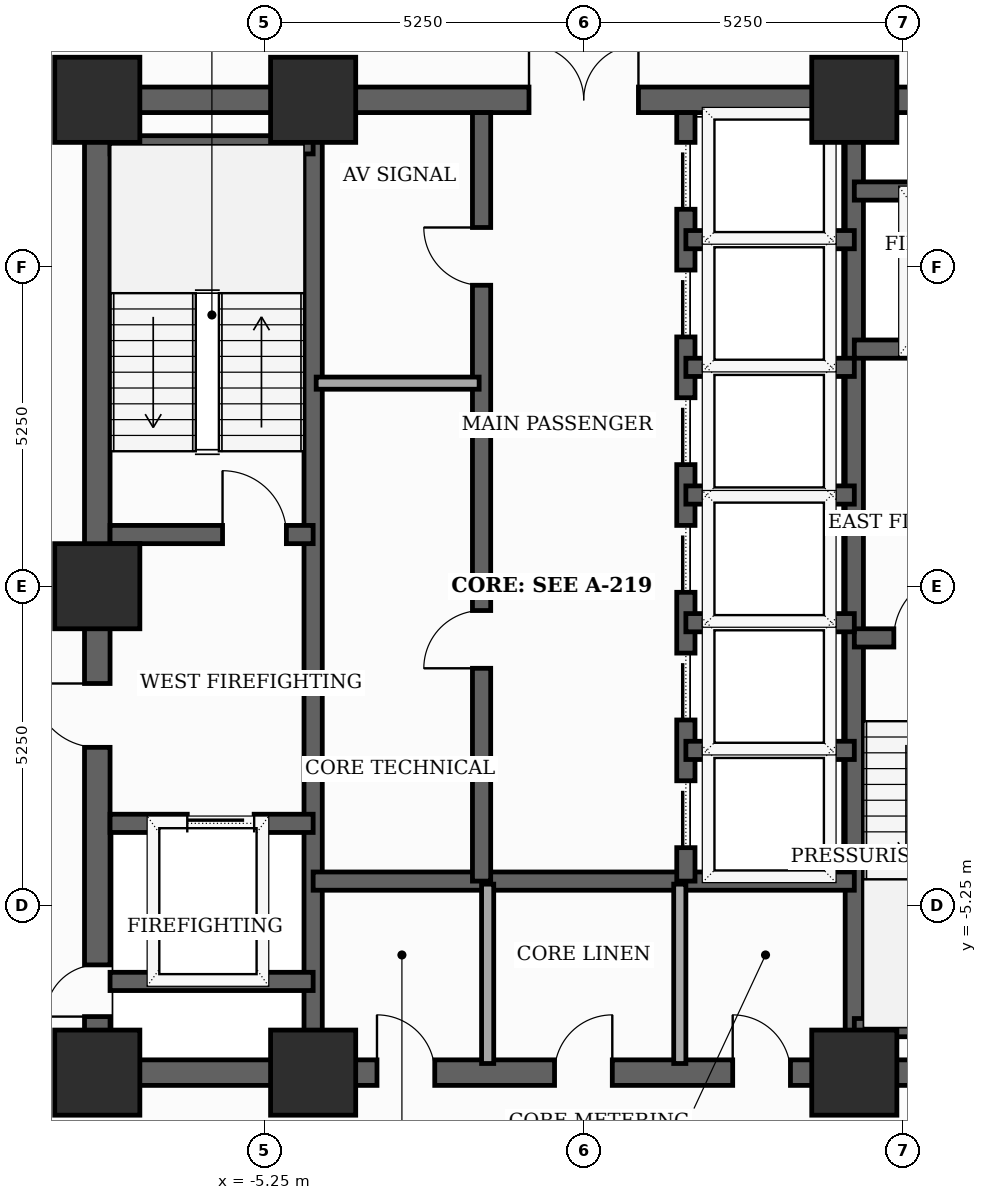
"""IFC4 building model, lengths in metres.
Left out: names, types, materials, properties, quantities, classifications, styles, units other than length and angle.
Written with IfcOpenShell. Run it as: python <this file> out.ifc"""

import sys

from ifc_helpers import new_model, si_unit, direction, frame, frame_2d, origin, origin_2d, place, context, subcontext, project, spatial, rectangle, extrude, element, fill, save


model = new_model("IFC4")
c1 = context("Model", 3, precision=1e-05, world=origin(), true_north=direction((0.0, 1.0)))
c2 = subcontext(c1, "Body", "Model", "MODEL_VIEW")
j1 = project(units=[si_unit("LENGTHUNIT", "METRE"), si_unit("PLANEANGLEUNIT", "RADIAN")], contexts=[c1])
p1 = place(None, origin())
s1 = spatial("IfcSite", under=j1, at=p1, CompositionType="ELEMENT")
p2 = place(p1, origin())
s2 = spatial("IfcBuilding", under=s1, at=p2, CompositionType="ELEMENT")
p3 = place(p2, frame((0.0, 0.0, 169.4)))
s3 = spatial("IfcBuildingStorey", under=s2, at=p3, CompositionType="ELEMENT", Elevation=169.4)
for number, where, z_axis, x_axis in (
    (1, (-8.0, -8.0, 0.0), (0.0, 0.0, 1.0), (1.0, 0.0, 0.0)),
    (2, (-4.45, -8.0, 0.0), (0.0, 0.0, 1.0), (1.0, 0.0, 0.0)),
    (3, (4.45, -8.0, 0.0), (0.0, 0.0, 1.0), (1.0, 0.0, 0.0)),
    (4, (4.45, 8.0, 0.0), (0.0, 0.0, 1.0), (1.0, 0.0, 0.0)),
    (5, (-4.45, 8.0, 0.0), (0.0, 0.0, 1.0), (1.0, 0.0, 0.0)),
    (6, (-8.0, 8.0, 0.0), (0.0, 0.0, 1.0), (1.0, 0.0, 0.0)),
    (7, (-8.0, 0.0, 0.0), (0.0, 0.0, 1.0), (1.0, 0.0, 0.0)),
):
    element("IfcColumn", number, at=place(p3, frame(where, z_axis=z_axis, x_axis=x_axis)), inside=s3, PredefinedType="COLUMN", context=c2, shape_type="SweptSolid", body=[
        extrude(rectangle(XDim=1.4, YDim=1.4, at=origin_2d()), origin(), (0.0, 0.0, 1.0), 3.7),
    ])
p4 = place(p3, frame((-8.0, -8.0, 0.0), z_axis=(0.0, 0.0, 1.0), x_axis=(0.0, 1.0, 0.0)))
e8 = element("IfcWall", 8, at=p4, inside=s3, PredefinedType="SHEAR", context=c2, shape_type="SweptSolid", body=[
    extrude(rectangle(XDim=16.0, YDim=0.42, at=frame_2d((8.0, 0.0))), origin(), (0.0, 0.0, 1.0), 3.5),
])
p5 = place(p4, frame((0.922, 0.0, 0.0)))
e9 = element("IfcOpeningElement", 9, at=p5, cuts=e8, PredefinedType="OPENING", context=c2, shape_type="SweptSolid", body=[
    extrude(rectangle(XDim=0.85, YDim=2.02, at=frame_2d((0.425, 1.01))), frame((0.0, 0.22, 0.0), z_axis=(0.0, -1.0, 0.0), x_axis=(1.0, 0.0, 0.0)), (0.0, 0.0, 1.0), 0.44),
])
p6 = place(p4, frame((5.35, 0.0, 0.0)))
e10 = element("IfcOpeningElement", 10, at=p6, cuts=e8, PredefinedType="OPENING", context=c2, shape_type="SweptSolid", body=[
    extrude(rectangle(XDim=1.05, YDim=2.15, at=frame_2d((0.525, 1.075))), frame((0.0, 0.22, 0.0), z_axis=(0.0, -1.0, 0.0), x_axis=(1.0, 0.0, 0.0)), (0.0, 0.0, 1.0), 0.44),
])
p7 = place(p3, frame((-8.0, -8.0, 0.0), z_axis=(0.0, 0.0, 1.0), x_axis=(1.0, 0.0, 0.0)))
e11 = element("IfcWall", 11, at=p7, inside=s3, PredefinedType="SHEAR", context=c2, shape_type="SweptSolid", body=[
    extrude(rectangle(XDim=16.0, YDim=0.42, at=frame_2d((8.0, 0.0))), origin(), (0.0, 0.0, 1.0), 3.5),
])
p8 = place(p7, frame((4.6, 0.0, 0.0)))
e12 = element("IfcOpeningElement", 12, at=p8, cuts=e11, PredefinedType="OPENING", context=c2, shape_type="SweptSolid", body=[
    extrude(rectangle(XDim=0.95, YDim=2.1, at=frame_2d((0.475, 1.05))), frame((0.0, 0.22, 0.0), z_axis=(0.0, -1.0, 0.0), x_axis=(1.0, 0.0, 0.0)), (0.0, 0.0, 1.0), 0.44),
])
p9 = place(p7, frame((7.52, 0.0, 0.0)))
e13 = element("IfcOpeningElement", 13, at=p9, cuts=e11, PredefinedType="OPENING", context=c2, shape_type="SweptSolid", body=[
    extrude(rectangle(XDim=0.95, YDim=2.1, at=frame_2d((0.475, 1.05))), frame((0.0, 0.22, 0.0), z_axis=(0.0, -1.0, 0.0), x_axis=(1.0, 0.0, 0.0)), (0.0, 0.0, 1.0), 0.44),
])
p10 = place(p7, frame((10.45, 0.0, 0.0)))
e14 = element("IfcOpeningElement", 14, at=p10, cuts=e11, PredefinedType="OPENING", context=c2, shape_type="SweptSolid", body=[
    extrude(rectangle(XDim=0.95, YDim=2.1, at=frame_2d((0.475, 1.05))), frame((0.0, 0.22, 0.0), z_axis=(0.0, -1.0, 0.0), x_axis=(1.0, 0.0, 0.0)), (0.0, 0.0, 1.0), 0.44),
])
p11 = place(p3, frame((-8.0, 8.0, 0.0), z_axis=(0.0, 0.0, 1.0), x_axis=(1.0, 0.0, 0.0)))
e15 = element("IfcWall", 15, at=p11, inside=s3, PredefinedType="SHEAR", context=c2, shape_type="SweptSolid", body=[
    extrude(rectangle(XDim=16.0, YDim=0.42, at=frame_2d((8.0, 0.0))), origin(), (0.0, 0.0, 1.0), 3.5),
])
p12 = place(p11, frame((7.1, 0.0, 0.0)))
e16 = element("IfcOpeningElement", 16, at=p12, cuts=e15, PredefinedType="OPENING", context=c2, shape_type="SweptSolid", body=[
    extrude(rectangle(XDim=1.8, YDim=2.15, at=frame_2d((0.9, 1.075))), frame((0.0, 0.22, 0.0), z_axis=(0.0, -1.0, 0.0), x_axis=(1.0, 0.0, 0.0)), (0.0, 0.0, 1.0), 0.44),
])
for number, where, z_axis, x_axis in (
    (17, (-4.45, -7.79, 0.0), (0.0, 0.0, 1.0), (0.0, 1.0, 0.0)),
    (18, (4.45, -7.79, 0.0), (0.0, 0.0, 1.0), (0.0, 1.0, 0.0)),
):
    element("IfcWall", number, at=place(p3, frame(where, z_axis=z_axis, x_axis=x_axis)), inside=s3, PredefinedType="SHEAR", context=c2, shape_type="SweptSolid", body=[
        extrude(rectangle(XDim=15.58, YDim=0.3, at=frame_2d((7.79, 0.0))), origin(), (0.0, 0.0, 1.0), 3.5),
    ])
p13 = place(p3, frame((-7.79, 0.85, 0.0), z_axis=(0.0, 0.0, 1.0), x_axis=(1.0, 0.0, 0.0)))
e19 = element("IfcWall", 19, at=p13, inside=s3, PredefinedType="SHEAR", context=c2, shape_type="SweptSolid", body=[
    extrude(rectangle(XDim=3.34, YDim=0.3, at=frame_2d((1.67, 0.0))), origin(), (0.0, 0.0, 1.0), 3.5),
])
p14 = place(p13, frame((1.85, 0.0, 0.0)))
e20 = element("IfcOpeningElement", 20, at=p14, cuts=e19, PredefinedType="OPENING", context=c2, shape_type="SweptSolid", body=[
    extrude(rectangle(XDim=1.05, YDim=2.15, at=frame_2d((0.525, 1.075))), frame((0.0, 0.16, 0.0), z_axis=(0.0, -1.0, 0.0), x_axis=(1.0, 0.0, 0.0)), (0.0, 0.0, 1.0), 0.32),
])
p15 = place(p3, frame((-7.79, 7.26, 0.0), z_axis=(0.0, 0.0, 1.0), x_axis=(1.0, 0.0, 0.0)))
e21 = element("IfcWall", 21, at=p15, inside=s3, PredefinedType="SHEAR", context=c2, shape_type="SweptSolid", body=[
    extrude(rectangle(XDim=3.34, YDim=0.3, at=frame_2d((1.67, 0.0))), origin(), (0.0, 0.0, 1.0), 3.5),
])
p16 = place(p3, frame((4.45, -0.85, 0.0), z_axis=(0.0, 0.0, 1.0), x_axis=(1.0, 0.0, 0.0)))
e22 = element("IfcWall", 22, at=p16, inside=s3, PredefinedType="SHEAR", context=c2, shape_type="SweptSolid", body=[
    extrude(rectangle(XDim=3.34, YDim=0.3, at=frame_2d((1.67, 0.0))), origin(), (0.0, 0.0, 1.0), 3.5),
])
p17 = place(p16, frame((0.65, 0.0, 0.0)))
e23 = element("IfcOpeningElement", 23, at=p17, cuts=e22, PredefinedType="OPENING", context=c2, shape_type="SweptSolid", body=[
    extrude(rectangle(XDim=1.05, YDim=2.15, at=frame_2d((0.525, 1.075))), frame((0.0, 0.16, 0.0), z_axis=(0.0, -1.0, 0.0), x_axis=(1.0, 0.0, 0.0)), (0.0, 0.0, 1.0), 0.32),
])
p18 = place(p3, frame((4.45, -7.26, 0.0), z_axis=(0.0, 0.0, 1.0), x_axis=(1.0, 0.0, 0.0)))
e24 = element("IfcWall", 24, at=p18, inside=s3, PredefinedType="SHEAR", context=c2, shape_type="SweptSolid", body=[
    extrude(rectangle(XDim=3.55, YDim=0.3, at=frame_2d((1.775, 0.0))), origin(), (0.0, 0.0, 1.0), 3.5),
])
p19 = place(p3, frame((-7.79, -3.9, 0.0), z_axis=(0.0, 0.0, 1.0), x_axis=(1.0, 0.0, 0.0)))
e25 = element("IfcWall", 25, at=p19, inside=s3, PredefinedType="SHEAR", context=c2, shape_type="SweptSolid", body=[
    extrude(rectangle(XDim=3.34, YDim=0.3, at=frame_2d((1.67, 0.0))), origin(), (0.0, 0.0, 1.0), 3.5),
])
p20 = place(p19, frame((1.27, 0.0, 0.0)))
e26 = element("IfcOpeningElement", 26, at=p20, cuts=e25, PredefinedType="OPENING", context=c2, shape_type="SweptSolid", body=[
    extrude(rectangle(XDim=1.1, YDim=2.1, at=frame_2d((0.55, 1.05))), frame((0.0, 0.16, 0.0), z_axis=(0.0, -1.0, 0.0), x_axis=(1.0, 0.0, 0.0)), (0.0, 0.0, 1.0), 0.32),
])
p21 = place(p3, frame((-7.79, -6.5, 0.0), z_axis=(0.0, 0.0, 1.0), x_axis=(1.0, 0.0, 0.0)))
e27 = element("IfcWall", 27, at=p21, inside=s3, PredefinedType="SHEAR", context=c2, shape_type="SweptSolid", body=[
    extrude(rectangle(XDim=3.34, YDim=0.3, at=frame_2d((1.67, 0.0))), origin(), (0.0, 0.0, 1.0), 3.5),
])
p22 = place(p3, frame((4.45, 3.9, 0.0), z_axis=(0.0, 0.0, 1.0), x_axis=(1.0, 0.0, 0.0)))
e28 = element("IfcWall", 28, at=p22, inside=s3, PredefinedType="SHEAR", context=c2, shape_type="SweptSolid", body=[
    extrude(rectangle(XDim=3.34, YDim=0.3, at=frame_2d((1.67, 0.0))), origin(), (0.0, 0.0, 1.0), 3.5),
])
p23 = place(p22, frame((1.18, 0.0, 0.0)))
e29 = element("IfcOpeningElement", 29, at=p23, cuts=e28, PredefinedType="OPENING", context=c2, shape_type="SweptSolid", body=[
    extrude(rectangle(XDim=1.1, YDim=2.1, at=frame_2d((0.55, 1.05))), frame((0.0, 0.16, 0.0), z_axis=(0.0, -1.0, 0.0), x_axis=(1.0, 0.0, 0.0)), (0.0, 0.0, 1.0), 0.32),
])
p24 = place(p3, frame((4.45, 6.5, 0.0), z_axis=(0.0, 0.0, 1.0), x_axis=(1.0, 0.0, 0.0)))
e30 = element("IfcWall", 30, at=p24, inside=s3, PredefinedType="SHEAR", context=c2, shape_type="SweptSolid", body=[
    extrude(rectangle(XDim=3.34, YDim=0.3, at=frame_2d((1.67, 0.0))), origin(), (0.0, 0.0, 1.0), 3.5),
])
p25 = place(p3, frame((-4.45, -4.85, 0.0), z_axis=(0.0, 0.0, 1.0), x_axis=(1.0, 0.0, 0.0)))
e31 = element("IfcWall", 31, at=p25, inside=s3, PredefinedType="SHEAR", context=c2, shape_type="SweptSolid", body=[
    extrude(rectangle(XDim=8.9, YDim=0.3, at=frame_2d((4.45, 0.0))), origin(), (0.0, 0.0, 1.0), 3.5),
])
p26 = place(p3, frame((-1.68, -4.85, 0.0), z_axis=(0.0, 0.0, 1.0), x_axis=(0.0, 1.0, 0.0)))
e32 = element("IfcWall", 32, at=p26, inside=s3, PredefinedType="SHEAR", context=c2, shape_type="SweptSolid", body=[
    extrude(rectangle(XDim=12.64, YDim=0.3, at=frame_2d((6.32, 0.0))), origin(), (0.0, 0.0, 1.0), 3.5),
])
p27 = place(p26, frame((3.5, 0.0, 0.0)))
e33 = element("IfcOpeningElement", 33, at=p27, cuts=e32, PredefinedType="OPENING", context=c2, shape_type="SweptSolid", body=[
    extrude(rectangle(XDim=0.95, YDim=2.1, at=frame_2d((0.475, 1.05))), frame((0.0, 0.16, 0.0), z_axis=(0.0, -1.0, 0.0), x_axis=(1.0, 0.0, 0.0)), (0.0, 0.0, 1.0), 0.32),
])
p28 = place(p26, frame((9.8, 0.0, 0.0)))
e34 = element("IfcOpeningElement", 34, at=p28, cuts=e32, PredefinedType="OPENING", context=c2, shape_type="SweptSolid", body=[
    extrude(rectangle(XDim=0.95, YDim=2.1, at=frame_2d((0.475, 1.05))), frame((0.0, 0.16, 0.0), z_axis=(0.0, -1.0, 0.0), x_axis=(1.0, 0.0, 0.0)), (0.0, 0.0, 1.0), 0.32),
])
p29 = place(p3, frame((1.68, -4.85, 0.0), z_axis=(0.0, 0.0, 1.0), x_axis=(0.0, 1.0, 0.0)))
e35 = element("IfcWall", 35, at=p29, inside=s3, PredefinedType="SHEAR", context=c2, shape_type="SweptSolid", body=[
    extrude(rectangle(XDim=12.64, YDim=0.3, at=frame_2d((6.32, 0.0))), origin(), (0.0, 0.0, 1.0), 3.5),
])
p30 = place(p29, frame((0.55, 0.0, 0.0)))
e36 = element("IfcOpeningElement", 36, at=p30, cuts=e35, PredefinedType="OPENING", context=c2, shape_type="SweptSolid", body=[
    extrude(rectangle(XDim=1.1, YDim=2.1, at=frame_2d((0.55, 1.05))), frame((0.0, 0.16, 0.0), z_axis=(0.0, -1.0, 0.0), x_axis=(1.0, 0.0, 0.0)), (0.0, 0.0, 1.0), 0.32),
])
p31 = place(p29, frame((2.65, 0.0, 0.0)))
e37 = element("IfcOpeningElement", 37, at=p31, cuts=e35, PredefinedType="OPENING", context=c2, shape_type="SweptSolid", body=[
    extrude(rectangle(XDim=1.1, YDim=2.1, at=frame_2d((0.55, 1.05))), frame((0.0, 0.16, 0.0), z_axis=(0.0, -1.0, 0.0), x_axis=(1.0, 0.0, 0.0)), (0.0, 0.0, 1.0), 0.32),
])
p32 = place(p29, frame((4.75, 0.0, 0.0)))
e38 = element("IfcOpeningElement", 38, at=p32, cuts=e35, PredefinedType="OPENING", context=c2, shape_type="SweptSolid", body=[
    extrude(rectangle(XDim=1.1, YDim=2.1, at=frame_2d((0.55, 1.05))), frame((0.0, 0.16, 0.0), z_axis=(0.0, -1.0, 0.0), x_axis=(1.0, 0.0, 0.0)), (0.0, 0.0, 1.0), 0.32),
])
p33 = place(p29, frame((6.85, 0.0, 0.0)))
e39 = element("IfcOpeningElement", 39, at=p33, cuts=e35, PredefinedType="OPENING", context=c2, shape_type="SweptSolid", body=[
    extrude(rectangle(XDim=1.1, YDim=2.1, at=frame_2d((0.55, 1.05))), frame((0.0, 0.16, 0.0), z_axis=(0.0, -1.0, 0.0), x_axis=(1.0, 0.0, 0.0)), (0.0, 0.0, 1.0), 0.32),
])
p34 = place(p29, frame((8.95, 0.0, 0.0)))
e40 = element("IfcOpeningElement", 40, at=p34, cuts=e35, PredefinedType="OPENING", context=c2, shape_type="SweptSolid", body=[
    extrude(rectangle(XDim=1.1, YDim=2.1, at=frame_2d((0.55, 1.05))), frame((0.0, 0.16, 0.0), z_axis=(0.0, -1.0, 0.0), x_axis=(1.0, 0.0, 0.0)), (0.0, 0.0, 1.0), 0.32),
])
p35 = place(p29, frame((11.05, 0.0, 0.0)))
e41 = element("IfcOpeningElement", 41, at=p35, cuts=e35, PredefinedType="OPENING", context=c2, shape_type="SweptSolid", body=[
    extrude(rectangle(XDim=1.1, YDim=2.1, at=frame_2d((0.55, 1.05))), frame((0.0, 0.16, 0.0), z_axis=(0.0, -1.0, 0.0), x_axis=(1.0, 0.0, 0.0)), (0.0, 0.0, 1.0), 0.32),
])
for number, where, z_axis, x_axis in (
    (42, (1.68, 1.5, 0.0), (0.0, 0.0, 1.0), (1.0, 0.0, 0.0)),
    (43, (1.68, 3.6, 0.0), (0.0, 0.0, 1.0), (1.0, 0.0, 0.0)),
    (44, (1.68, 5.7, 0.0), (0.0, 0.0, 1.0), (1.0, 0.0, 0.0)),
    (45, (1.68, -2.7, 0.0), (0.0, 0.0, 1.0), (1.0, 0.0, 0.0)),
    (46, (1.68, -0.6, 0.0), (0.0, 0.0, 1.0), (1.0, 0.0, 0.0)),
):
    element("IfcWall", number, at=place(p3, frame(where, z_axis=z_axis, x_axis=x_axis)), inside=s3, PredefinedType="SHEAR", context=c2, shape_type="SweptSolid", body=[
        extrude(rectangle(XDim=2.77, YDim=0.3, at=frame_2d((1.385, 0.0))), origin(), (0.0, 0.0, 1.0), 3.5),
    ])
for number, where, z_axis, x_axis in (
    (47, (-1.58, -7.85, 0.0), (0.0, 0.0, 1.0), (0.0, 1.0, 0.0)),
    (48, (1.58, -7.85, 0.0), (0.0, 0.0, 1.0), (0.0, 1.0, 0.0)),
):
    element("IfcWall", number, at=place(p3, frame(where, z_axis=z_axis, x_axis=x_axis)), inside=s3, PredefinedType="SOLIDWALL", context=c2, shape_type="SweptSolid", body=[
        extrude(rectangle(XDim=2.95, YDim=0.2, at=frame_2d((1.475, 0.0))), origin(), (0.0, 0.0, 1.0), 2.885),
    ])
p36 = place(p3, frame((-4.4, 3.34, 0.0), z_axis=(0.0, 0.0, 1.0), x_axis=(1.0, 0.0, 0.0)))
e49 = element("IfcWall", 49, at=p36, inside=s3, PredefinedType="SOLIDWALL", context=c2, shape_type="SweptSolid", body=[
    extrude(rectangle(XDim=2.68, YDim=0.2, at=frame_2d((1.34, 0.0))), origin(), (0.0, 0.0, 1.0), 3.5),
])
p37 = place(p5, origin())
e50 = element("IfcDoor", 50, at=p37, inside=s3, OperationType="SINGLE_SWING_LEFT", PredefinedType="TRAPDOOR", context=c2, shape_type="SweptSolid", body=[
    extrude(rectangle(XDim=0.85, YDim=2.02, at=frame_2d((0.425, 1.01))), frame((0.0, 0.025, 0.0), z_axis=(0.0, -1.0, 0.0), x_axis=(1.0, 0.0, 0.0)), (0.0, 0.0, 1.0), 0.05),
])
fill(e9, e50)
p38 = place(p6, origin())
e51 = element("IfcDoor", 51, at=p38, inside=s3, OperationType="SINGLE_SWING_RIGHT", PredefinedType="DOOR", context=c2, shape_type="SweptSolid", body=[
    extrude(rectangle(XDim=1.05, YDim=2.15, at=frame_2d((0.525, 1.075))), frame((0.0, 0.025, 0.0), z_axis=(0.0, -1.0, 0.0), x_axis=(1.0, 0.0, 0.0)), (0.0, 0.0, 1.0), 0.05),
])
fill(e10, e51)
p39 = place(p8, origin())
e52 = element("IfcDoor", 52, at=p39, inside=s3, OperationType="SINGLE_SWING_LEFT", PredefinedType="DOOR", context=c2, shape_type="SweptSolid", body=[
    extrude(rectangle(XDim=0.95, YDim=2.1, at=frame_2d((0.475, 1.05))), frame((0.0, 0.025, 0.0), z_axis=(0.0, -1.0, 0.0), x_axis=(1.0, 0.0, 0.0)), (0.0, 0.0, 1.0), 0.05),
])
fill(e12, e52)
p40 = place(p9, origin())
e53 = element("IfcDoor", 53, at=p40, inside=s3, OperationType="SINGLE_SWING_RIGHT", PredefinedType="DOOR", context=c2, shape_type="SweptSolid", body=[
    extrude(rectangle(XDim=0.95, YDim=2.1, at=frame_2d((0.475, 1.05))), frame((0.0, 0.025, 0.0), z_axis=(0.0, -1.0, 0.0), x_axis=(1.0, 0.0, 0.0)), (0.0, 0.0, 1.0), 0.05),
])
fill(e13, e53)
p41 = place(p10, origin())
e54 = element("IfcDoor", 54, at=p41, inside=s3, OperationType="SINGLE_SWING_LEFT", PredefinedType="DOOR", context=c2, shape_type="SweptSolid", body=[
    extrude(rectangle(XDim=0.95, YDim=2.1, at=frame_2d((0.475, 1.05))), frame((0.0, 0.025, 0.0), z_axis=(0.0, -1.0, 0.0), x_axis=(1.0, 0.0, 0.0)), (0.0, 0.0, 1.0), 0.05),
])
fill(e14, e54)
p42 = place(p12, origin())
e55 = element("IfcDoor", 55, at=p42, inside=s3, OperationType="DOUBLE_DOOR_SINGLE_SWING", PredefinedType="DOOR", context=c2, shape_type="SweptSolid", body=[
    extrude(rectangle(XDim=1.8, YDim=2.15, at=frame_2d((0.9, 1.075))), frame((0.0, 0.025, 0.0), z_axis=(0.0, -1.0, 0.0), x_axis=(1.0, 0.0, 0.0)), (0.0, 0.0, 1.0), 0.05),
])
fill(e16, e55)
p43 = place(p14, origin())
e56 = element("IfcDoor", 56, at=p43, inside=s3, OperationType="SINGLE_SWING_LEFT", PredefinedType="DOOR", context=c2, shape_type="SweptSolid", body=[
    extrude(rectangle(XDim=1.05, YDim=2.15, at=frame_2d((0.525, 1.075))), frame((0.0, 0.025, 0.0), z_axis=(0.0, -1.0, 0.0), x_axis=(1.0, 0.0, 0.0)), (0.0, 0.0, 1.0), 0.05),
])
fill(e20, e56)
p44 = place(p17, origin())
e57 = element("IfcDoor", 57, at=p44, inside=s3, OperationType="SINGLE_SWING_RIGHT", PredefinedType="DOOR", context=c2, shape_type="SweptSolid", body=[
    extrude(rectangle(XDim=1.05, YDim=2.15, at=frame_2d((0.525, 1.075))), frame((0.0, 0.025, 0.0), z_axis=(0.0, -1.0, 0.0), x_axis=(1.0, 0.0, 0.0)), (0.0, 0.0, 1.0), 0.05),
])
fill(e23, e57)
p45 = place(p20, origin())
e58 = element("IfcDoor", 58, at=p45, inside=s3, OperationType="SLIDING_TO_LEFT", PredefinedType="DOOR", context=c2, shape_type="SweptSolid", body=[
    extrude(rectangle(XDim=1.1, YDim=2.1, at=frame_2d((0.55, 1.05))), frame((0.0, 0.025, 0.0), z_axis=(0.0, -1.0, 0.0), x_axis=(1.0, 0.0, 0.0)), (0.0, 0.0, 1.0), 0.05),
])
fill(e26, e58)
p46 = place(p27, origin())
e59 = element("IfcDoor", 59, at=p46, inside=s3, OperationType="SINGLE_SWING_LEFT", PredefinedType="DOOR", context=c2, shape_type="SweptSolid", body=[
    extrude(rectangle(XDim=0.95, YDim=2.1, at=frame_2d((0.475, 1.05))), frame((0.0, 0.025, 0.0), z_axis=(0.0, -1.0, 0.0), x_axis=(1.0, 0.0, 0.0)), (0.0, 0.0, 1.0), 0.05),
])
fill(e33, e59)
p47 = place(p28, origin())
e60 = element("IfcDoor", 60, at=p47, inside=s3, OperationType="SINGLE_SWING_RIGHT", PredefinedType="DOOR", context=c2, shape_type="SweptSolid", body=[
    extrude(rectangle(XDim=0.95, YDim=2.1, at=frame_2d((0.475, 1.05))), frame((0.0, 0.025, 0.0), z_axis=(0.0, -1.0, 0.0), x_axis=(1.0, 0.0, 0.0)), (0.0, 0.0, 1.0), 0.05),
])
fill(e34, e60)
p48 = place(p30, origin())
e61 = element("IfcDoor", 61, at=p48, inside=s3, OperationType="SLIDING_TO_LEFT", PredefinedType="DOOR", context=c2, shape_type="SweptSolid", body=[
    extrude(rectangle(XDim=1.1, YDim=2.1, at=frame_2d((0.55, 1.05))), frame((0.0, 0.025, 0.0), z_axis=(0.0, -1.0, 0.0), x_axis=(1.0, 0.0, 0.0)), (0.0, 0.0, 1.0), 0.05),
])
fill(e36, e61)
p49 = place(p31, origin())
e62 = element("IfcDoor", 62, at=p49, inside=s3, OperationType="SLIDING_TO_LEFT", PredefinedType="DOOR", context=c2, shape_type="SweptSolid", body=[
    extrude(rectangle(XDim=1.1, YDim=2.1, at=frame_2d((0.55, 1.05))), frame((0.0, 0.025, 0.0), z_axis=(0.0, -1.0, 0.0), x_axis=(1.0, 0.0, 0.0)), (0.0, 0.0, 1.0), 0.05),
])
fill(e37, e62)
p50 = place(p32, origin())
e63 = element("IfcDoor", 63, at=p50, inside=s3, OperationType="SLIDING_TO_LEFT", PredefinedType="DOOR", context=c2, shape_type="SweptSolid", body=[
    extrude(rectangle(XDim=1.1, YDim=2.1, at=frame_2d((0.55, 1.05))), frame((0.0, 0.025, 0.0), z_axis=(0.0, -1.0, 0.0), x_axis=(1.0, 0.0, 0.0)), (0.0, 0.0, 1.0), 0.05),
])
fill(e38, e63)
p51 = place(p33, origin())
e64 = element("IfcDoor", 64, at=p51, inside=s3, OperationType="SLIDING_TO_LEFT", PredefinedType="DOOR", context=c2, shape_type="SweptSolid", body=[
    extrude(rectangle(XDim=1.1, YDim=2.1, at=frame_2d((0.55, 1.05))), frame((0.0, 0.025, 0.0), z_axis=(0.0, -1.0, 0.0), x_axis=(1.0, 0.0, 0.0)), (0.0, 0.0, 1.0), 0.05),
])
fill(e39, e64)
p52 = place(p34, origin())
e65 = element("IfcDoor", 65, at=p52, inside=s3, OperationType="SLIDING_TO_LEFT", PredefinedType="DOOR", context=c2, shape_type="SweptSolid", body=[
    extrude(rectangle(XDim=1.1, YDim=2.1, at=frame_2d((0.55, 1.05))), frame((0.0, 0.025, 0.0), z_axis=(0.0, -1.0, 0.0), x_axis=(1.0, 0.0, 0.0)), (0.0, 0.0, 1.0), 0.05),
])
fill(e40, e65)
p53 = place(p35, origin())
e66 = element("IfcDoor", 66, at=p53, inside=s3, OperationType="SLIDING_TO_LEFT", PredefinedType="DOOR", context=c2, shape_type="SweptSolid", body=[
    extrude(rectangle(XDim=1.1, YDim=2.1, at=frame_2d((0.55, 1.05))), frame((0.0, 0.025, 0.0), z_axis=(0.0, -1.0, 0.0), x_axis=(1.0, 0.0, 0.0)), (0.0, 0.0, 1.0), 0.05),
])
fill(e41, e66)
save(model, sys.argv[1])
